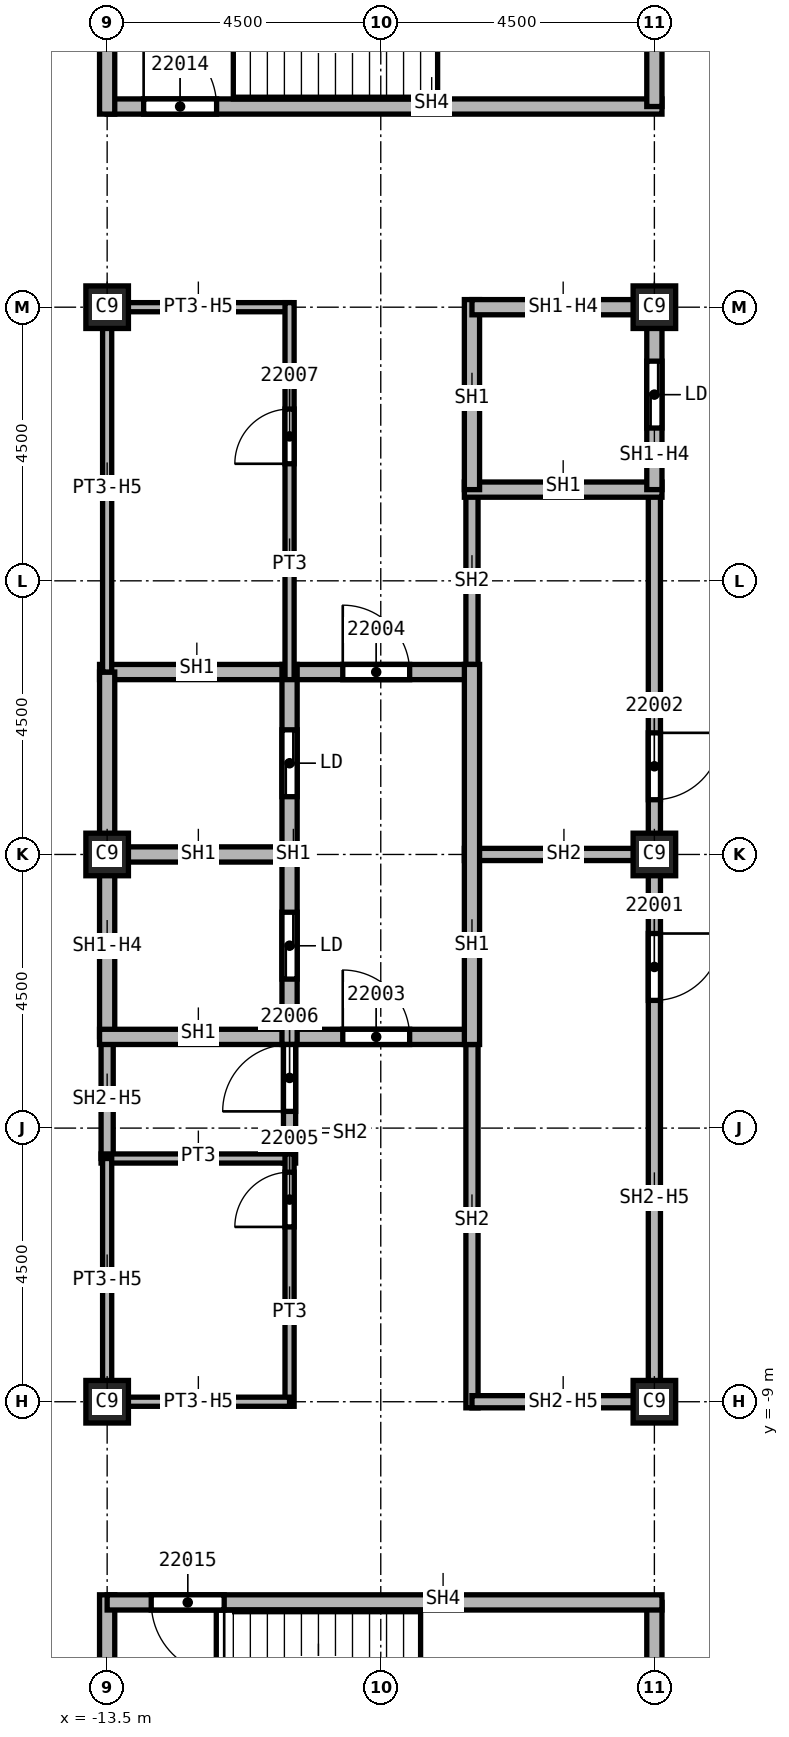
"""IFC4 building model, lengths in metres.
Left out: names, types, materials, properties, quantities, classifications, styles, units other than length and angle.
Written with IfcOpenShell. Run it as: python <this file> out.ifc"""

import sys

from ifc_helpers import new_model, si_unit, direction, frame, frame_2d, origin, origin_2d, place, context, subcontext, project, spatial, rectangle, extrude, element, fill, save


model = new_model("IFC4")
c1 = context("Model", 3, precision=1e-05, world=origin(), true_north=direction((0.0, 1.0)))
c2 = subcontext(c1, "Body", "Model", "MODEL_VIEW")
j1 = project(units=[si_unit("LENGTHUNIT", "METRE"), si_unit("PLANEANGLEUNIT", "RADIAN")], contexts=[c1])
p1 = place(None, origin())
s1 = spatial("IfcSite", under=j1, at=p1, CompositionType="ELEMENT")
p2 = place(p1, origin())
s2 = spatial("IfcBuilding", under=s1, at=p2, CompositionType="ELEMENT")
p3 = place(p2, frame((0.0, 0.0, 316.0)))
s3 = spatial("IfcBuildingStorey", under=s2, at=p3, CompositionType="ELEMENT", Elevation=316.0)
for number, where, z_axis, x_axis in (
    (1, (-4.5, 0.0, 0.0), (0.0, 0.0, 1.0), (1.0, 0.0, 0.0)),
    (2, (-4.5, 9.0, 0.0), (0.0, 0.0, 1.0), (1.0, 0.0, 0.0)),
    (3, (-4.5, -9.0, 0.0), (0.0, 0.0, 1.0), (1.0, 0.0, 0.0)),
    (4, (-13.5, 0.0, 0.0), (0.0, 0.0, 1.0), (1.0, 0.0, 0.0)),
    (5, (-13.5, 9.0, 0.0), (0.0, 0.0, 1.0), (1.0, 0.0, 0.0)),
    (6, (-13.5, -9.0, 0.0), (0.0, 0.0, 1.0), (1.0, 0.0, 0.0)),
):
    element("IfcColumn", number, at=place(p3, frame(where, z_axis=z_axis, x_axis=x_axis)), inside=s3, PredefinedType="COLUMN", context=c2, shape_type="SweptSolid", body=[
        extrude(rectangle(XDim=0.7, YDim=0.7, at=origin_2d()), origin(), (0.0, 0.0, 1.0), 3.59),
    ])
p4 = place(p3, frame((-13.5, -5.0, 0.0), z_axis=(0.0, 0.0, 1.0), x_axis=(0.0, 1.0, 0.0)))
e7 = element("IfcWall", 7, at=p4, inside=s3, PredefinedType="SOLIDWALL", context=c2, shape_type="SweptSolid", body=[
    extrude(rectangle(XDim=2.0, YDim=0.2, at=frame_2d((1.0, 0.0))), origin(), (0.0, 0.0, 1.0), 2.828),
])
p5 = place(p3, frame((-10.5, -5.075, 0.0), z_axis=(0.0, 0.0, 1.0), x_axis=(0.0, 1.0, 0.0)))
e8 = element("IfcWall", 8, at=p5, inside=s3, PredefinedType="SOLIDWALL", context=c2, shape_type="SweptSolid", body=[
    extrude(rectangle(XDim=2.2, YDim=0.2, at=frame_2d((1.1, 0.0))), origin(), (0.0, 0.0, 1.0), 3.59),
])
p6 = place(p5, frame((0.85, 0.0, 0.0)))
e9 = element("IfcOpeningElement", 9, at=p6, cuts=e8, PredefinedType="OPENING", context=c2, shape_type="SweptSolid", body=[
    extrude(rectangle(XDim=1.1, YDim=2.1, at=frame_2d((0.55, 1.05))), frame((0.0, 0.1, 0.0), z_axis=(0.0, -1.0, 0.0), x_axis=(1.0, 0.0, 0.0)), (0.0, 0.0, 1.0), 0.2),
])
p7 = place(p3, frame((-7.625, 0.0, 0.0), z_axis=(0.0, 0.0, 1.0), x_axis=(1.0, 0.0, 0.0)))
e10 = element("IfcWall", 10, at=p7, inside=s3, PredefinedType="SOLIDWALL", context=c2, shape_type="SweptSolid", body=[
    extrude(rectangle(XDim=3.225, YDim=0.2, at=frame_2d((1.613, 0.0))), origin(), (0.0, 0.0, 1.0), 3.59),
])
p8 = place(p3, frame((-7.5, -9.1, 0.0), z_axis=(0.0, 0.0, 1.0), x_axis=(0.0, 1.0, 0.0)))
e11 = element("IfcWall", 11, at=p8, inside=s3, PredefinedType="SOLIDWALL", context=c2, shape_type="SweptSolid", body=[
    extrude(rectangle(XDim=6.225, YDim=0.2, at=frame_2d((3.113, 0.0))), origin(), (0.0, 0.0, 1.0), 3.59),
])
p9 = place(p3, frame((-7.5, 2.875, 0.0), z_axis=(0.0, 0.0, 1.0), x_axis=(0.0, 1.0, 0.0)))
e12 = element("IfcWall", 12, at=p9, inside=s3, PredefinedType="SOLIDWALL", context=c2, shape_type="SweptSolid", body=[
    extrude(rectangle(XDim=3.125, YDim=0.2, at=frame_2d((1.562, 0.0))), origin(), (0.0, 0.0, 1.0), 3.59),
])
p10 = place(p3, frame((-4.5, -9.0, 0.0), z_axis=(0.0, 0.0, 1.0), x_axis=(-1.0, 0.0, 0.0)))
e13 = element("IfcWall", 13, at=p10, inside=s3, PredefinedType="SOLIDWALL", context=c2, shape_type="SweptSolid", body=[
    extrude(rectangle(XDim=3.0, YDim=0.2, at=frame_2d((1.5, 0.0))), origin(), (0.0, 0.0, 1.0), 2.828),
])
p11 = place(p3, frame((-4.5, 6.0, 0.0), z_axis=(0.0, 0.0, 1.0), x_axis=(0.0, -1.0, 0.0)))
e14 = element("IfcWall", 14, at=p11, inside=s3, PredefinedType="SOLIDWALL", context=c2, shape_type="SweptSolid", body=[
    extrude(rectangle(XDim=15.1, YDim=0.2, at=frame_2d((7.55, 0.0))), origin(), (0.0, 0.0, 1.0), 2.828),
])
p12 = place(p11, frame((7.3, 0.0, 0.0)))
e15 = element("IfcOpeningElement", 15, at=p12, cuts=e14, PredefinedType="OPENING", context=c2, shape_type="SweptSolid", body=[
    extrude(rectangle(XDim=1.1, YDim=2.1, at=frame_2d((0.55, 1.05))), frame((0.0, 0.1, 0.0), z_axis=(0.0, -1.0, 0.0), x_axis=(1.0, 0.0, 0.0)), (0.0, 0.0, 1.0), 0.2),
])
p13 = place(p11, frame((4.0, 0.0, 0.0)))
e16 = element("IfcOpeningElement", 16, at=p13, cuts=e14, PredefinedType="OPENING", context=c2, shape_type="SweptSolid", body=[
    extrude(rectangle(XDim=1.1, YDim=2.1, at=frame_2d((0.55, 1.05))), frame((0.0, 0.1, 0.0), z_axis=(0.0, -1.0, 0.0), x_axis=(1.0, 0.0, 0.0)), (0.0, 0.0, 1.0), 0.2),
])
p14 = place(p3, frame((-13.625, 0.0, 0.0), z_axis=(0.0, 0.0, 1.0), x_axis=(1.0, 0.0, 0.0)))
e17 = element("IfcWall", 17, at=p14, inside=s3, PredefinedType="SOLIDWALL", context=c2, shape_type="SweptSolid", body=[
    extrude(rectangle(XDim=3.125, YDim=0.25, at=frame_2d((1.562, 0.0))), origin(), (0.0, 0.0, 1.0), 3.59),
])
p15 = place(p3, frame((-13.625, 3.0, 0.0), z_axis=(0.0, 0.0, 1.0), x_axis=(1.0, 0.0, 0.0)))
e18 = element("IfcWall", 18, at=p15, inside=s3, PredefinedType="SOLIDWALL", context=c2, shape_type="SweptSolid", body=[
    extrude(rectangle(XDim=6.125, YDim=0.25, at=frame_2d((3.062, 0.0))), origin(), (0.0, 0.0, 1.0), 3.59),
])
p16 = place(p15, frame((4.0, 0.0, 0.0)))
e19 = element("IfcOpeningElement", 19, at=p16, cuts=e18, PredefinedType="OPENING", context=c2, shape_type="SweptSolid", body=[
    extrude(rectangle(XDim=1.1, YDim=2.1, at=frame_2d((0.55, 1.05))), frame((0.0, 0.125, 0.0), z_axis=(0.0, -1.0, 0.0), x_axis=(1.0, 0.0, 0.0)), (0.0, 0.0, 1.0), 0.25),
])
p17 = place(p3, frame((-13.5, -3.0, 0.0), z_axis=(0.0, 0.0, 1.0), x_axis=(0.0, 1.0, 0.0)))
e20 = element("IfcWall", 20, at=p17, inside=s3, PredefinedType="SOLIDWALL", context=c2, shape_type="SweptSolid", body=[
    extrude(rectangle(XDim=6.0, YDim=0.25, at=frame_2d((3.0, 0.0))), origin(), (0.0, 0.0, 1.0), 2.828),
])
p18 = place(p3, frame((-13.625, -3.0, 0.0), z_axis=(0.0, 0.0, 1.0), x_axis=(1.0, 0.0, 0.0)))
e21 = element("IfcWall", 21, at=p18, inside=s3, PredefinedType="SOLIDWALL", context=c2, shape_type="SweptSolid", body=[
    extrude(rectangle(XDim=6.125, YDim=0.25, at=frame_2d((3.062, 0.0))), origin(), (0.0, 0.0, 1.0), 3.59),
])
p19 = place(p18, frame((4.0, 0.0, 0.0)))
e22 = element("IfcOpeningElement", 22, at=p19, cuts=e21, PredefinedType="OPENING", context=c2, shape_type="SweptSolid", body=[
    extrude(rectangle(XDim=1.1, YDim=2.1, at=frame_2d((0.55, 1.05))), frame((0.0, 0.125, 0.0), z_axis=(0.0, -1.0, 0.0), x_axis=(1.0, 0.0, 0.0)), (0.0, 0.0, 1.0), 0.25),
])
p20 = place(p3, frame((-10.5, -3.125, 0.0), z_axis=(0.0, 0.0, 1.0), x_axis=(0.0, 1.0, 0.0)))
e23 = element("IfcWall", 23, at=p20, inside=s3, PredefinedType="SOLIDWALL", context=c2, shape_type="SweptSolid", body=[
    extrude(rectangle(XDim=6.25, YDim=0.25, at=frame_2d((3.125, 0.0))), origin(), (0.0, 0.0, 1.0), 3.59),
])
p21 = place(p20, frame((1.075, 0.0, 0.0)))
e24 = element("IfcOpeningElement", 24, at=p21, cuts=e23, PredefinedType="OPENING", context=c2, shape_type="SweptSolid", body=[
    extrude(rectangle(XDim=1.1, YDim=2.1, at=frame_2d((0.55, 1.05))), frame((0.0, 0.125, 0.0), z_axis=(0.0, -1.0, 0.0), x_axis=(1.0, 0.0, 0.0)), (0.0, 0.0, 1.0), 0.25),
])
p22 = place(p20, frame((4.075, 0.0, 0.0)))
e25 = element("IfcOpeningElement", 25, at=p22, cuts=e23, PredefinedType="OPENING", context=c2, shape_type="SweptSolid", body=[
    extrude(rectangle(XDim=1.1, YDim=2.1, at=frame_2d((0.55, 1.05))), frame((0.0, 0.125, 0.0), z_axis=(0.0, -1.0, 0.0), x_axis=(1.0, 0.0, 0.0)), (0.0, 0.0, 1.0), 0.25),
])
p23 = place(p3, frame((-7.625, 6.0, 0.0), z_axis=(0.0, 0.0, 1.0), x_axis=(1.0, 0.0, 0.0)))
e26 = element("IfcWall", 26, at=p23, inside=s3, PredefinedType="SOLIDWALL", context=c2, shape_type="SweptSolid", body=[
    extrude(rectangle(XDim=3.25, YDim=0.25, at=frame_2d((1.625, 0.0))), origin(), (0.0, 0.0, 1.0), 3.59),
])
p24 = place(p3, frame((-7.5, -3.125, 0.0), z_axis=(0.0, 0.0, 1.0), x_axis=(0.0, 1.0, 0.0)))
e27 = element("IfcWall", 27, at=p24, inside=s3, PredefinedType="SOLIDWALL", context=c2, shape_type="SweptSolid", body=[
    extrude(rectangle(XDim=6.25, YDim=0.25, at=frame_2d((3.125, 0.0))), origin(), (0.0, 0.0, 1.0), 3.59),
])
p25 = place(p3, frame((-7.5, 6.0, 0.0), z_axis=(0.0, 0.0, 1.0), x_axis=(0.0, 1.0, 0.0)))
e28 = element("IfcWall", 28, at=p25, inside=s3, PredefinedType="SOLIDWALL", context=c2, shape_type="SweptSolid", body=[
    extrude(rectangle(XDim=3.125, YDim=0.25, at=frame_2d((1.562, 0.0))), origin(), (0.0, 0.0, 1.0), 3.59),
])
p26 = place(p3, frame((-7.5, 9.0, 0.0), z_axis=(0.0, 0.0, 1.0), x_axis=(1.0, 0.0, 0.0)))
e29 = element("IfcWall", 29, at=p26, inside=s3, PredefinedType="SOLIDWALL", context=c2, shape_type="SweptSolid", body=[
    extrude(rectangle(XDim=3.0, YDim=0.25, at=frame_2d((1.5, 0.0))), origin(), (0.0, 0.0, 1.0), 2.828),
])
p27 = place(p3, frame((-4.5, 9.125, 0.0), z_axis=(0.0, 0.0, 1.0), x_axis=(0.0, -1.0, 0.0)))
e30 = element("IfcWall", 30, at=p27, inside=s3, PredefinedType="SOLIDWALL", context=c2, shape_type="SweptSolid", body=[
    extrude(rectangle(XDim=3.125, YDim=0.25, at=frame_2d((1.562, 0.0))), origin(), (0.0, 0.0, 1.0), 2.828),
])
p28 = place(p27, frame((1.012, 0.0, 0.0)))
e31 = element("IfcOpeningElement", 31, at=p28, cuts=e30, PredefinedType="OPENING", context=c2, shape_type="SweptSolid", body=[
    extrude(rectangle(XDim=1.1, YDim=2.1, at=frame_2d((0.55, 1.05))), frame((0.0, 0.125, 0.0), z_axis=(0.0, -1.0, 0.0), x_axis=(1.0, 0.0, 0.0)), (0.0, 0.0, 1.0), 0.25),
])
p29 = place(p3, frame((-13.5, -12.175, 0.0), z_axis=(0.0, 0.0, 1.0), x_axis=(0.0, -1.0, 0.0)))
e32 = element("IfcWall", 32, at=p29, inside=s3, PredefinedType="SOLIDWALL", context=c2, shape_type="SweptSolid", body=[
    extrude(rectangle(XDim=4.75, YDim=0.25, at=frame_2d((2.375, 0.0))), origin(), (0.0, 0.0, 1.0), 3.59),
])
p30 = place(p3, frame((-13.5, 12.3, 0.0), z_axis=(0.0, 0.0, 1.0), x_axis=(1.0, 0.0, 0.0)))
e33 = element("IfcWall", 33, at=p30, inside=s3, PredefinedType="SOLIDWALL", context=c2, shape_type="SweptSolid", body=[
    extrude(rectangle(XDim=9.125, YDim=0.25, at=frame_2d((4.562, 0.0))), origin(), (0.0, 0.0, 1.0), 3.59),
])
p31 = place(p30, frame((0.6, 0.0, 0.0)))
e34 = element("IfcOpeningElement", 34, at=p31, cuts=e33, PredefinedType="OPENING", context=c2, shape_type="SweptSolid", body=[
    extrude(rectangle(XDim=1.2, YDim=2.1, at=frame_2d((0.6, 1.05))), frame((0.0, 0.125, 0.0), z_axis=(0.0, -1.0, 0.0), x_axis=(1.0, 0.0, 0.0)), (0.0, 0.0, 1.0), 0.25),
])
p32 = place(p3, frame((-13.5, 12.175, 0.0), z_axis=(0.0, 0.0, 1.0), x_axis=(0.0, 1.0, 0.0)))
e35 = element("IfcWall", 35, at=p32, inside=s3, PredefinedType="SOLIDWALL", context=c2, shape_type="SweptSolid", body=[
    extrude(rectangle(XDim=4.75, YDim=0.25, at=frame_2d((2.375, 0.0))), origin(), (0.0, 0.0, 1.0), 3.59),
])
p33 = place(p3, frame((-4.5, -12.3, 0.0), z_axis=(0.0, 0.0, 1.0), x_axis=(0.0, -1.0, 0.0)))
e36 = element("IfcWall", 36, at=p33, inside=s3, PredefinedType="SOLIDWALL", context=c2, shape_type="SweptSolid", body=[
    extrude(rectangle(XDim=4.625, YDim=0.25, at=frame_2d((2.312, 0.0))), origin(), (0.0, 0.0, 1.0), 3.59),
])
p34 = place(p3, frame((-4.5, 16.8, 0.0), z_axis=(0.0, 0.0, 1.0), x_axis=(0.0, -1.0, 0.0)))
e37 = element("IfcWall", 37, at=p34, inside=s3, PredefinedType="SOLIDWALL", context=c2, shape_type="SweptSolid", body=[
    extrude(rectangle(XDim=4.5, YDim=0.25, at=frame_2d((2.25, 0.0))), origin(), (0.0, 0.0, 1.0), 3.59),
])
p35 = place(p3, frame((-4.375, -12.3, 0.0), z_axis=(0.0, 0.0, 1.0), x_axis=(-1.0, 0.0, 0.0)))
e38 = element("IfcWall", 38, at=p35, inside=s3, PredefinedType="SOLIDWALL", context=c2, shape_type="SweptSolid", body=[
    extrude(rectangle(XDim=9.125, YDim=0.25, at=frame_2d((4.562, 0.0))), origin(), (0.0, 0.0, 1.0), 3.59),
])
p36 = place(p35, frame((7.2, 0.0, 0.0)))
e39 = element("IfcOpeningElement", 39, at=p36, cuts=e38, PredefinedType="OPENING", context=c2, shape_type="SweptSolid", body=[
    extrude(rectangle(XDim=1.2, YDim=2.1, at=frame_2d((0.6, 1.05))), frame((0.0, 0.125, 0.0), z_axis=(0.0, -1.0, 0.0), x_axis=(1.0, 0.0, 0.0)), (0.0, 0.0, 1.0), 0.25),
])
p37 = place(p3, frame((-13.6, -5.0, 0.0), z_axis=(0.0, 0.0, 1.0), x_axis=(1.0, 0.0, 0.0)))
e40 = element("IfcWall", 40, at=p37, inside=s3, PredefinedType="PARTITIONING", context=c2, shape_type="SweptSolid", body=[
    extrude(rectangle(XDim=3.1, YDim=0.15, at=frame_2d((1.55, 0.0))), origin(), (0.0, 0.0, 1.0), 3.59),
])
p38 = place(p3, frame((-13.5, -9.075, 0.0), z_axis=(0.0, 0.0, 1.0), x_axis=(0.0, 1.0, 0.0)))
e41 = element("IfcWall", 41, at=p38, inside=s3, PredefinedType="PARTITIONING", context=c2, shape_type="SweptSolid", body=[
    extrude(rectangle(XDim=4.075, YDim=0.15, at=frame_2d((2.038, 0.0))), origin(), (0.0, 0.0, 1.0), 2.828),
])
p39 = place(p3, frame((-13.5, 3.0, 0.0), z_axis=(0.0, 0.0, 1.0), x_axis=(0.0, 1.0, 0.0)))
e42 = element("IfcWall", 42, at=p39, inside=s3, PredefinedType="PARTITIONING", context=c2, shape_type="SweptSolid", body=[
    extrude(rectangle(XDim=6.075, YDim=0.15, at=frame_2d((3.038, 0.0))), origin(), (0.0, 0.0, 1.0), 2.828),
])
p40 = place(p3, frame((-13.5, 9.0, 0.0), z_axis=(0.0, 0.0, 1.0), x_axis=(1.0, 0.0, 0.0)))
e43 = element("IfcWall", 43, at=p40, inside=s3, PredefinedType="PARTITIONING", context=c2, shape_type="SweptSolid", body=[
    extrude(rectangle(XDim=3.0, YDim=0.15, at=frame_2d((1.5, 0.0))), origin(), (0.0, 0.0, 1.0), 2.828),
])
p41 = place(p3, frame((-10.5, -9.075, 0.0), z_axis=(0.0, 0.0, 1.0), x_axis=(0.0, 1.0, 0.0)))
e44 = element("IfcWall", 44, at=p41, inside=s3, PredefinedType="PARTITIONING", context=c2, shape_type="SweptSolid", body=[
    extrude(rectangle(XDim=4.15, YDim=0.15, at=frame_2d((2.075, 0.0))), origin(), (0.0, 0.0, 1.0), 3.59),
])
p42 = place(p41, frame((2.95, 0.0, 0.0)))
e45 = element("IfcOpeningElement", 45, at=p42, cuts=e44, PredefinedType="OPENING", context=c2, shape_type="SweptSolid", body=[
    extrude(rectangle(XDim=0.9, YDim=2.1, at=frame_2d((0.45, 1.05))), frame((0.0, 0.075, 0.0), z_axis=(0.0, -1.0, 0.0), x_axis=(1.0, 0.0, 0.0)), (0.0, 0.0, 1.0), 0.15),
])
p43 = place(p3, frame((-10.5, -9.0, 0.0), z_axis=(0.0, 0.0, 1.0), x_axis=(-1.0, 0.0, 0.0)))
e46 = element("IfcWall", 46, at=p43, inside=s3, PredefinedType="PARTITIONING", context=c2, shape_type="SweptSolid", body=[
    extrude(rectangle(XDim=3.0, YDim=0.15, at=frame_2d((1.5, 0.0))), origin(), (0.0, 0.0, 1.0), 2.828),
])
p44 = place(p3, frame((-10.5, 2.875, 0.0), z_axis=(0.0, 0.0, 1.0), x_axis=(0.0, 1.0, 0.0)))
e47 = element("IfcWall", 47, at=p44, inside=s3, PredefinedType="PARTITIONING", context=c2, shape_type="SweptSolid", body=[
    extrude(rectangle(XDim=6.2, YDim=0.15, at=frame_2d((3.1, 0.0))), origin(), (0.0, 0.0, 1.0), 3.59),
])
p45 = place(p44, frame((3.55, 0.0, 0.0)))
e48 = element("IfcOpeningElement", 48, at=p45, cuts=e47, PredefinedType="OPENING", context=c2, shape_type="SweptSolid", body=[
    extrude(rectangle(XDim=0.9, YDim=2.1, at=frame_2d((0.45, 1.05))), frame((0.0, 0.075, 0.0), z_axis=(0.0, -1.0, 0.0), x_axis=(1.0, 0.0, 0.0)), (0.0, 0.0, 1.0), 0.15),
])
p46 = place(p12, origin())
e49 = element("IfcDoor", 49, at=p46, inside=s3, OperationType="SINGLE_SWING_RIGHT", PredefinedType="DOOR", context=c2, shape_type="SweptSolid", body=[
    extrude(rectangle(XDim=1.1, YDim=2.1, at=frame_2d((0.55, 1.05))), frame((0.0, 0.025, 0.0), z_axis=(0.0, -1.0, 0.0), x_axis=(1.0, 0.0, 0.0)), (0.0, 0.0, 1.0), 0.05),
])
fill(e15, e49)
p47 = place(p13, origin())
e50 = element("IfcDoor", 50, at=p47, inside=s3, OperationType="SINGLE_SWING_LEFT", PredefinedType="DOOR", context=c2, shape_type="SweptSolid", body=[
    extrude(rectangle(XDim=1.1, YDim=2.1, at=frame_2d((0.55, 1.05))), frame((0.0, 0.025, 0.0), z_axis=(0.0, -1.0, 0.0), x_axis=(1.0, 0.0, 0.0)), (0.0, 0.0, 1.0), 0.05),
])
fill(e16, e50)
p48 = place(p19, origin())
e51 = element("IfcDoor", 51, at=p48, inside=s3, OperationType="SINGLE_SWING_RIGHT", PredefinedType="DOOR", context=c2, shape_type="SweptSolid", body=[
    extrude(rectangle(XDim=1.1, YDim=2.1, at=frame_2d((0.55, 1.05))), frame((0.0, 0.025, 0.0), z_axis=(0.0, -1.0, 0.0), x_axis=(1.0, 0.0, 0.0)), (0.0, 0.0, 1.0), 0.05),
])
fill(e22, e51)
p49 = place(p16, origin())
e52 = element("IfcDoor", 52, at=p49, inside=s3, OperationType="SINGLE_SWING_LEFT", PredefinedType="DOOR", context=c2, shape_type="SweptSolid", body=[
    extrude(rectangle(XDim=1.1, YDim=2.1, at=frame_2d((0.55, 1.05))), frame((0.0, 0.025, 0.0), z_axis=(0.0, -1.0, 0.0), x_axis=(1.0, 0.0, 0.0)), (0.0, 0.0, 1.0), 0.05),
])
fill(e19, e52)
p50 = place(p42, origin())
e53 = element("IfcDoor", 53, at=p50, inside=s3, OperationType="SINGLE_SWING_RIGHT", PredefinedType="DOOR", context=c2, shape_type="SweptSolid", body=[
    extrude(rectangle(XDim=0.9, YDim=2.1, at=frame_2d((0.45, 1.05))), frame((0.0, 0.025, 0.0), z_axis=(0.0, -1.0, 0.0), x_axis=(1.0, 0.0, 0.0)), (0.0, 0.0, 1.0), 0.05),
])
fill(e45, e53)
p51 = place(p6, origin())
e54 = element("IfcDoor", 54, at=p51, inside=s3, OperationType="SINGLE_SWING_LEFT", PredefinedType="DOOR", context=c2, shape_type="SweptSolid", body=[
    extrude(rectangle(XDim=1.1, YDim=2.1, at=frame_2d((0.55, 1.05))), frame((0.0, 0.025, 0.0), z_axis=(0.0, -1.0, 0.0), x_axis=(1.0, 0.0, 0.0)), (0.0, 0.0, 1.0), 0.05),
])
fill(e9, e54)
p52 = place(p45, origin())
e55 = element("IfcDoor", 55, at=p52, inside=s3, OperationType="SINGLE_SWING_RIGHT", PredefinedType="DOOR", context=c2, shape_type="SweptSolid", body=[
    extrude(rectangle(XDim=0.9, YDim=2.1, at=frame_2d((0.45, 1.05))), frame((0.0, 0.025, 0.0), z_axis=(0.0, -1.0, 0.0), x_axis=(1.0, 0.0, 0.0)), (0.0, 0.0, 1.0), 0.05),
])
fill(e48, e55)
p53 = place(p31, origin())
e56 = element("IfcDoor", 56, at=p53, inside=s3, OperationType="SINGLE_SWING_LEFT", PredefinedType="DOOR", context=c2, shape_type="SweptSolid", body=[
    extrude(rectangle(XDim=1.2, YDim=2.1, at=frame_2d((0.6, 1.05))), frame((0.0, 0.025, 0.0), z_axis=(0.0, -1.0, 0.0), x_axis=(1.0, 0.0, 0.0)), (0.0, 0.0, 1.0), 0.05),
])
fill(e34, e56)
p54 = place(p36, origin())
e57 = element("IfcDoor", 57, at=p54, inside=s3, OperationType="SINGLE_SWING_RIGHT", PredefinedType="DOOR", context=c2, shape_type="SweptSolid", body=[
    extrude(rectangle(XDim=1.2, YDim=2.1, at=frame_2d((0.6, 1.05))), frame((0.0, 0.025, 0.0), z_axis=(0.0, -1.0, 0.0), x_axis=(1.0, 0.0, 0.0)), (0.0, 0.0, 1.0), 0.05),
])
fill(e39, e57)
p55 = place(p28, origin())
e58 = element("IfcDoor", 58, at=p55, inside=s3, OperationType="SLIDING_TO_LEFT", PredefinedType="DOOR", context=c2, shape_type="SweptSolid", body=[
    extrude(rectangle(XDim=1.1, YDim=2.1, at=frame_2d((0.55, 1.05))), frame((0.0, 0.025, 0.0), z_axis=(0.0, -1.0, 0.0), x_axis=(1.0, 0.0, 0.0)), (0.0, 0.0, 1.0), 0.05),
])
fill(e31, e58)
p56 = place(p21, origin())
e59 = element("IfcDoor", 59, at=p56, inside=s3, OperationType="SLIDING_TO_LEFT", PredefinedType="DOOR", context=c2, shape_type="SweptSolid", body=[
    extrude(rectangle(XDim=1.1, YDim=2.1, at=frame_2d((0.55, 1.05))), frame((0.0, 0.025, 0.0), z_axis=(0.0, -1.0, 0.0), x_axis=(1.0, 0.0, 0.0)), (0.0, 0.0, 1.0), 0.05),
])
fill(e24, e59)
p57 = place(p22, origin())
e60 = element("IfcDoor", 60, at=p57, inside=s3, OperationType="SLIDING_TO_LEFT", PredefinedType="DOOR", context=c2, shape_type="SweptSolid", body=[
    extrude(rectangle(XDim=1.1, YDim=2.1, at=frame_2d((0.55, 1.05))), frame((0.0, 0.025, 0.0), z_axis=(0.0, -1.0, 0.0), x_axis=(1.0, 0.0, 0.0)), (0.0, 0.0, 1.0), 0.05),
])
fill(e25, e60)
save(model, sys.argv[1])
